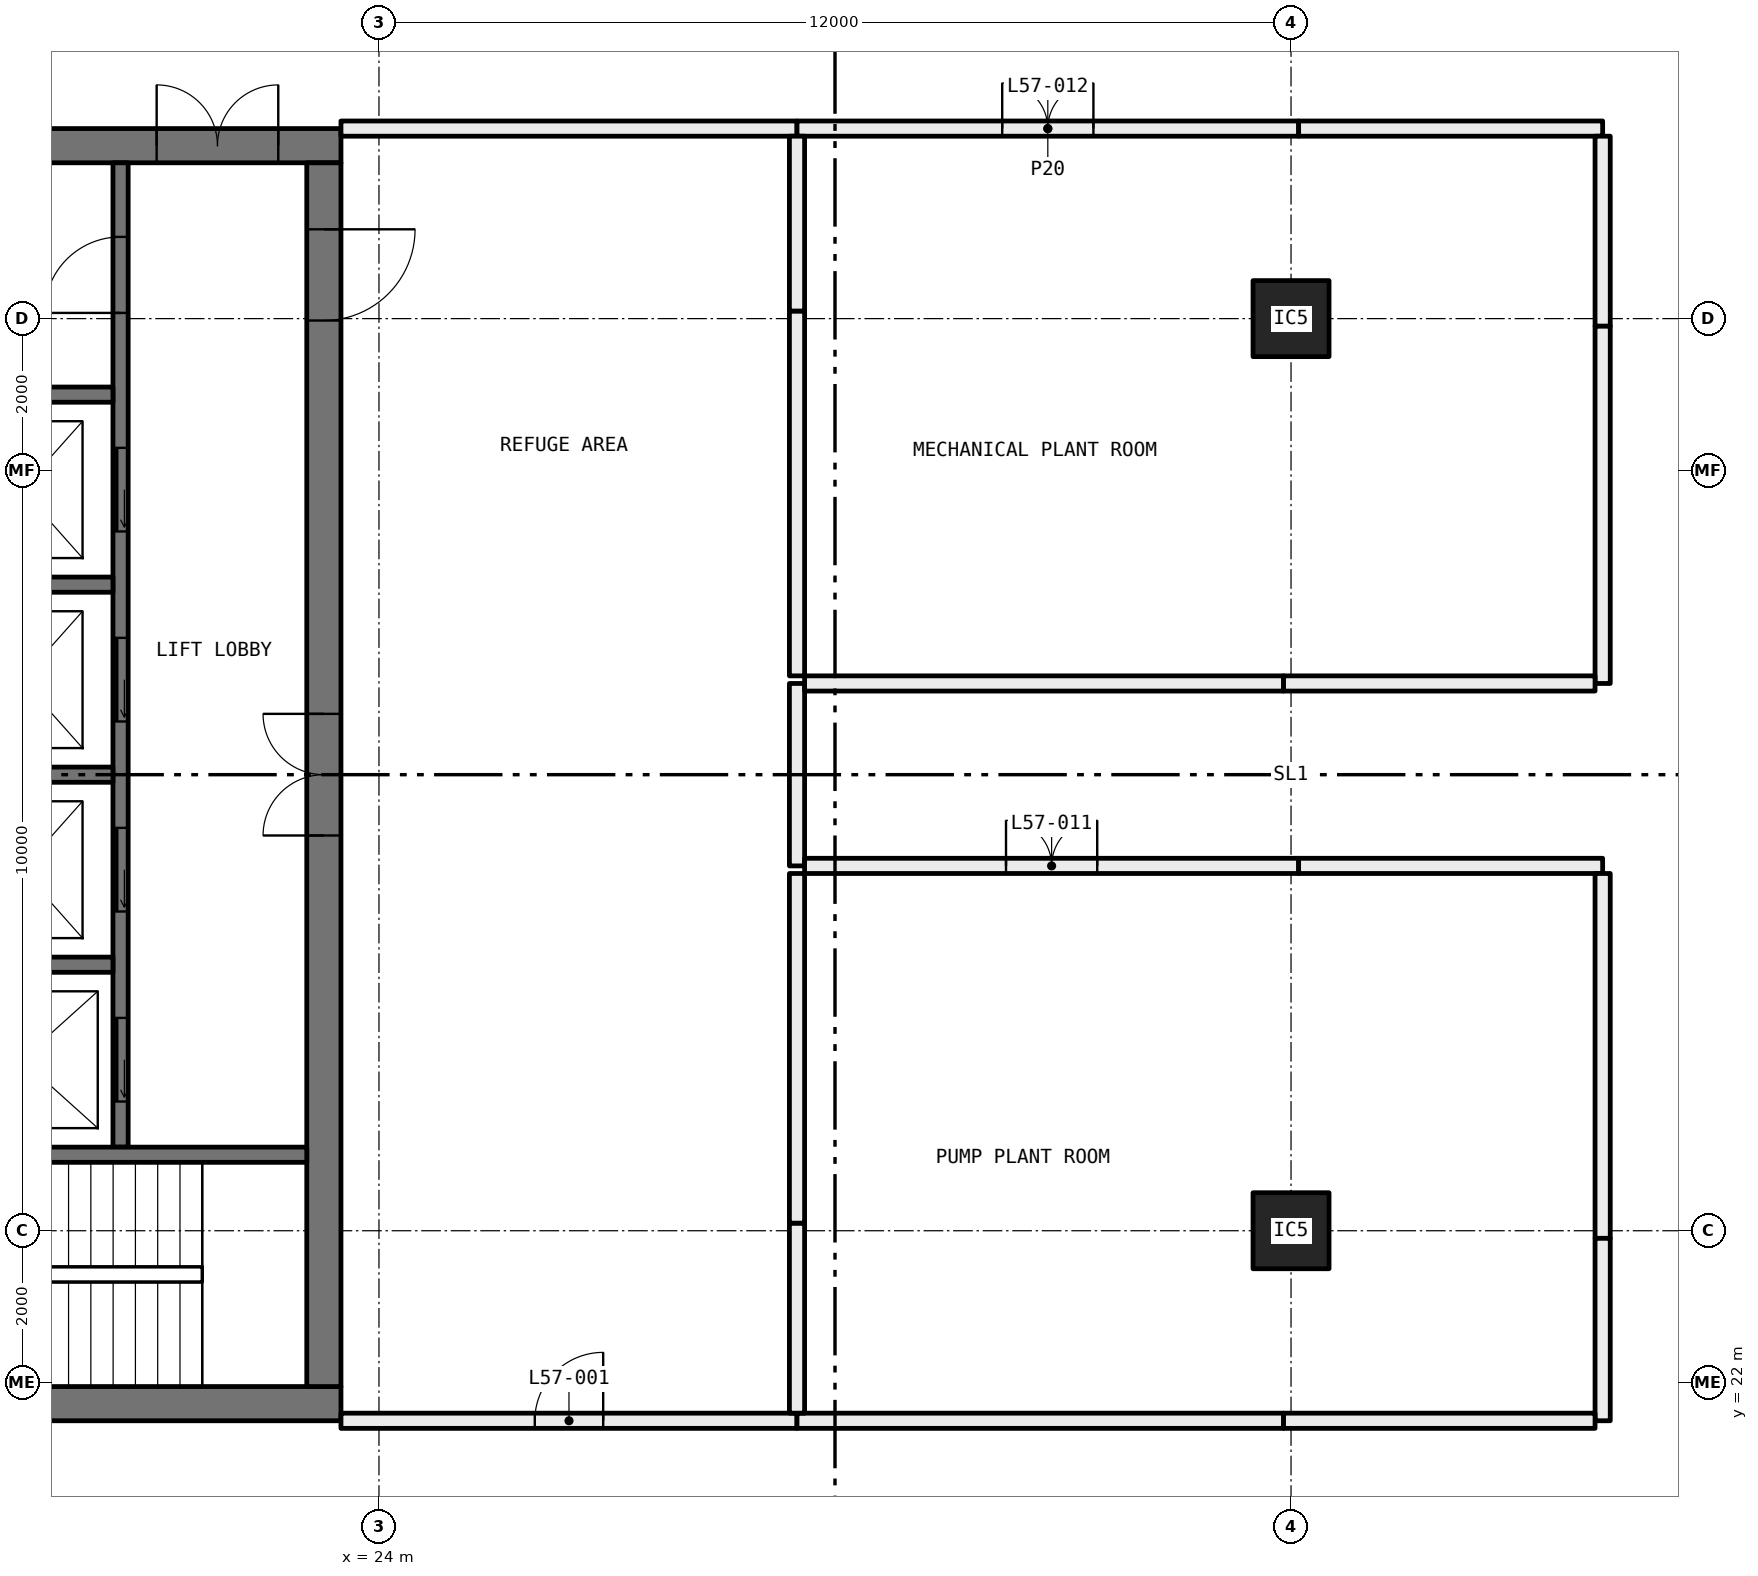
"""IFC4 building model, lengths in metres.
Left out: names, types, materials, properties, quantities, classifications, styles, units other than length and angle.
Written with IfcOpenShell. Run it as: python <this file> out.ifc"""

import sys

from ifc_helpers import new_model, si_unit, direction, frame, frame_2d, origin, origin_2d, place, context, subcontext, project, spatial, rectangle, hollow_rectangle, extrude, element, fill, save


model = new_model("IFC4")
c1 = context("Model", 3, precision=1e-05, world=origin(), true_north=direction((0.0, 1.0)))
c2 = subcontext(c1, "Body", "Model", "MODEL_VIEW")
j1 = project(units=[si_unit("LENGTHUNIT", "METRE"), si_unit("PLANEANGLEUNIT", "RADIAN")], contexts=[c1])
p1 = place(None, origin())
s1 = spatial("IfcSite", under=j1, at=p1, CompositionType="ELEMENT")
p2 = place(p1, origin())
s2 = spatial("IfcBuilding", under=s1, at=p2, CompositionType="ELEMENT")
p3 = place(p2, frame((0.0, 0.0, 213.45)))
s3 = spatial("IfcBuildingStorey", under=s2, at=p3, CompositionType="ELEMENT", Elevation=213.45)
for number, where, z_axis, x_axis in (
    (1, (36.0, 24.0, 0.0), (0.0, 0.0, 1.0), (1.0, 0.0, 0.0)),
    (2, (36.0, 36.0, 0.0), (0.0, 0.0, 1.0), (1.0, 0.0, 0.0)),
):
    element("IfcColumn", number, at=place(p3, frame(where, z_axis=z_axis, x_axis=x_axis)), inside=s3, PredefinedType="COLUMN", context=c2, shape_type="SweptSolid", body=[
        extrude(hollow_rectangle(XDim=1.0, YDim=1.0, WallThickness=0.04, at=origin_2d()), origin(), (0.0, 0.0, 1.0), 4.1),
    ])
p4 = place(p3, frame((29.5, 21.5, 0.0), z_axis=(0.0, 0.0, 1.0), x_axis=(-1.0, 0.0, 0.0)))
e3 = element("IfcWall", 3, at=p4, inside=s3, PredefinedType="PARTITIONING", context=c2, shape_type="SweptSolid", body=[
    extrude(rectangle(XDim=6.0, YDim=0.2, at=frame_2d((3.0, 0.0))), origin(), (0.0, 0.0, 1.0), 4.1),
])
p5 = place(p4, frame((2.55, 0.0, 0.0)))
e4 = element("IfcOpeningElement", 4, at=p5, cuts=e3, PredefinedType="OPENING", context=c2, shape_type="SweptSolid", body=[
    extrude(rectangle(XDim=0.9, YDim=2.1, at=frame_2d((0.45, 1.05))), frame((0.0, 0.11, 0.0), z_axis=(0.0, -1.0, 0.0), x_axis=(1.0, 0.0, 0.0)), (0.0, 0.0, 1.0), 0.22),
])
p6 = place(p3, frame((23.5, 38.5, 0.0), z_axis=(0.0, 0.0, 1.0), x_axis=(1.0, 0.0, 0.0)))
e5 = element("IfcWall", 5, at=p6, inside=s3, PredefinedType="PARTITIONING", context=c2, shape_type="SweptSolid", body=[
    extrude(rectangle(XDim=6.0, YDim=0.2, at=frame_2d((3.0, 0.0))), origin(), (0.0, 0.0, 1.0), 4.1),
])
p7 = place(p3, frame((29.5, 31.2, 0.0), z_axis=(0.0, 0.0, 1.0), x_axis=(0.0, -1.0, 0.0)))
e6 = element("IfcWall", 6, at=p7, inside=s3, PredefinedType="PARTITIONING", context=c2, shape_type="SweptSolid", body=[
    extrude(rectangle(XDim=2.4, YDim=0.2, at=frame_2d((1.2, 0.0))), origin(), (0.0, 0.0, 1.0), 3.6),
])
p8 = place(p3, frame((29.6, 28.8, 0.0), z_axis=(0.0, 0.0, 1.0), x_axis=(1.0, 0.0, 0.0)))
e7 = element("IfcWall", 7, at=p8, inside=s3, PredefinedType="PARTITIONING", context=c2, shape_type="SweptSolid", body=[
    extrude(rectangle(XDim=6.5, YDim=0.2, at=frame_2d((3.25, 0.0))), origin(), (0.0, 0.0, 1.0), 3.5),
])
p9 = place(p8, frame((2.65, 0.0, 0.0)))
e8 = element("IfcOpeningElement", 8, at=p9, cuts=e7, PredefinedType="OPENING", context=c2, shape_type="SweptSolid", body=[
    extrude(rectangle(XDim=1.2, YDim=2.1, at=frame_2d((0.6, 1.05))), frame((0.0, 0.11, 0.0), z_axis=(0.0, -1.0, 0.0), x_axis=(1.0, 0.0, 0.0)), (0.0, 0.0, 1.0), 0.22),
])
p10 = place(p3, frame((36.1, 28.8, 0.0), z_axis=(0.0, 0.0, 1.0), x_axis=(1.0, 0.0, 0.0)))
e9 = element("IfcWall", 9, at=p10, inside=s3, PredefinedType="PARTITIONING", context=c2, shape_type="SweptSolid", body=[
    extrude(rectangle(XDim=4.0, YDim=0.2, at=frame_2d((2.0, 0.0))), origin(), (0.0, 0.0, 1.0), 4.1),
])
p11 = place(p3, frame((40.1, 28.7, 0.0), z_axis=(0.0, 0.0, 1.0), x_axis=(0.0, -1.0, 0.0)))
e10 = element("IfcWall", 10, at=p11, inside=s3, PredefinedType="PARTITIONING", context=c2, shape_type="SweptSolid", body=[
    extrude(rectangle(XDim=4.8, YDim=0.2, at=frame_2d((2.4, 0.0))), origin(), (0.0, 0.0, 1.0), 3.5),
])
p12 = place(p3, frame((40.1, 23.9, 0.0), z_axis=(0.0, 0.0, 1.0), x_axis=(0.0, -1.0, 0.0)))
e11 = element("IfcWall", 11, at=p12, inside=s3, PredefinedType="PARTITIONING", context=c2, shape_type="SweptSolid", body=[
    extrude(rectangle(XDim=2.4, YDim=0.2, at=frame_2d((1.2, 0.0))), origin(), (0.0, 0.0, 1.0), 4.1),
])
p13 = place(p3, frame((40.0, 21.5, 0.0), z_axis=(0.0, 0.0, 1.0), x_axis=(-1.0, 0.0, 0.0)))
e12 = element("IfcWall", 12, at=p13, inside=s3, PredefinedType="PARTITIONING", context=c2, shape_type="SweptSolid", body=[
    extrude(rectangle(XDim=4.1, YDim=0.2, at=frame_2d((2.05, 0.0))), origin(), (0.0, 0.0, 1.0), 3.5),
])
p14 = place(p3, frame((35.9, 21.5, 0.0), z_axis=(0.0, 0.0, 1.0), x_axis=(-1.0, 0.0, 0.0)))
e13 = element("IfcWall", 13, at=p14, inside=s3, PredefinedType="PARTITIONING", context=c2, shape_type="SweptSolid", body=[
    extrude(rectangle(XDim=6.4, YDim=0.2, at=frame_2d((3.2, 0.0))), origin(), (0.0, 0.0, 1.0), 4.1),
])
p15 = place(p3, frame((29.5, 38.5, 0.0), z_axis=(0.0, 0.0, 1.0), x_axis=(1.0, 0.0, 0.0)))
e14 = element("IfcWall", 14, at=p15, inside=s3, PredefinedType="PARTITIONING", context=c2, shape_type="SweptSolid", body=[
    extrude(rectangle(XDim=6.6, YDim=0.2, at=frame_2d((3.3, 0.0))), origin(), (0.0, 0.0, 1.0), 3.5),
])
p16 = place(p15, frame((2.7, 0.0, 0.0)))
e15 = element("IfcOpeningElement", 15, at=p16, cuts=e14, PredefinedType="OPENING", context=c2, shape_type="SweptSolid", body=[
    extrude(rectangle(XDim=1.2, YDim=2.1, at=frame_2d((0.6, 1.05))), frame((0.0, 0.11, 0.0), z_axis=(0.0, -1.0, 0.0), x_axis=(1.0, 0.0, 0.0)), (0.0, 0.0, 1.0), 0.22),
])
p17 = place(p3, frame((36.1, 38.5, 0.0), z_axis=(0.0, 0.0, 1.0), x_axis=(1.0, 0.0, 0.0)))
e16 = element("IfcWall", 16, at=p17, inside=s3, PredefinedType="PARTITIONING", context=c2, shape_type="SweptSolid", body=[
    extrude(rectangle(XDim=4.0, YDim=0.2, at=frame_2d((2.0, 0.0))), origin(), (0.0, 0.0, 1.0), 4.1),
])
p18 = place(p3, frame((40.1, 38.4, 0.0), z_axis=(0.0, 0.0, 1.0), x_axis=(0.0, -1.0, 0.0)))
e17 = element("IfcWall", 17, at=p18, inside=s3, PredefinedType="PARTITIONING", context=c2, shape_type="SweptSolid", body=[
    extrude(rectangle(XDim=2.5, YDim=0.2, at=frame_2d((1.25, 0.0))), origin(), (0.0, 0.0, 1.0), 3.5),
])
p19 = place(p3, frame((40.1, 35.9, 0.0), z_axis=(0.0, 0.0, 1.0), x_axis=(0.0, -1.0, 0.0)))
e18 = element("IfcWall", 18, at=p19, inside=s3, PredefinedType="PARTITIONING", context=c2, shape_type="SweptSolid", body=[
    extrude(rectangle(XDim=4.7, YDim=0.2, at=frame_2d((2.35, 0.0))), origin(), (0.0, 0.0, 1.0), 4.1),
])
p20 = place(p3, frame((40.0, 31.2, 0.0), z_axis=(0.0, 0.0, 1.0), x_axis=(-1.0, 0.0, 0.0)))
e19 = element("IfcWall", 19, at=p20, inside=s3, PredefinedType="PARTITIONING", context=c2, shape_type="SweptSolid", body=[
    extrude(rectangle(XDim=4.1, YDim=0.2, at=frame_2d((2.05, 0.0))), origin(), (0.0, 0.0, 1.0), 3.5),
])
p21 = place(p3, frame((35.9, 31.2, 0.0), z_axis=(0.0, 0.0, 1.0), x_axis=(-1.0, 0.0, 0.0)))
e20 = element("IfcWall", 20, at=p21, inside=s3, PredefinedType="PARTITIONING", context=c2, shape_type="SweptSolid", body=[
    extrude(rectangle(XDim=6.3, YDim=0.2, at=frame_2d((3.15, 0.0))), origin(), (0.0, 0.0, 1.0), 4.1),
])
p22 = place(p3, frame((29.5, 21.6, 0.0), z_axis=(0.0, 0.0, 1.0), x_axis=(0.0, 1.0, 0.0)))
e21 = element("IfcWall", 21, at=p22, inside=s3, PredefinedType="PARTITIONING", context=c2, shape_type="SweptSolid", body=[
    extrude(rectangle(XDim=2.5, YDim=0.2, at=frame_2d((1.25, 0.0))), origin(), (0.0, 0.0, 1.0), 3.5),
])
p23 = place(p3, frame((29.5, 24.1, 0.0), z_axis=(0.0, 0.0, 1.0), x_axis=(0.0, 1.0, 0.0)))
e22 = element("IfcWall", 22, at=p23, inside=s3, PredefinedType="PARTITIONING", context=c2, shape_type="SweptSolid", body=[
    extrude(rectangle(XDim=4.6, YDim=0.2, at=frame_2d((2.3, 0.0))), origin(), (0.0, 0.0, 1.0), 3.6),
])
p24 = place(p3, frame((29.5, 31.3, 0.0), z_axis=(0.0, 0.0, 1.0), x_axis=(0.0, 1.0, 0.0)))
e23 = element("IfcWall", 23, at=p24, inside=s3, PredefinedType="PARTITIONING", context=c2, shape_type="SweptSolid", body=[
    extrude(rectangle(XDim=4.8, YDim=0.2, at=frame_2d((2.4, 0.0))), origin(), (0.0, 0.0, 1.0), 3.5),
])
p25 = place(p3, frame((29.5, 36.1, 0.0), z_axis=(0.0, 0.0, 1.0), x_axis=(0.0, 1.0, 0.0)))
e24 = element("IfcWall", 24, at=p25, inside=s3, PredefinedType="PARTITIONING", context=c2, shape_type="SweptSolid", body=[
    extrude(rectangle(XDim=2.3, YDim=0.2, at=frame_2d((1.15, 0.0))), origin(), (0.0, 0.0, 1.0), 4.1),
])
p26 = place(p3, frame((12.5, 21.725, 0.0), z_axis=(0.0, 0.0, 1.0), x_axis=(1.0, 0.0, 0.0)))
e25 = element("IfcWall", 25, at=p26, inside=s3, PredefinedType="SHEAR", context=c2, shape_type="SweptSolid", body=[
    extrude(rectangle(XDim=11.0, YDim=0.45, at=frame_2d((5.5, 0.0))), origin(), (0.0, 0.0, 1.0), 4.1),
])
p27 = place(p26, frame((1.125, 0.0, 0.0)))
e26 = element("IfcOpeningElement", 26, at=p27, cuts=e25, PredefinedType="OPENING", context=c2, shape_type="SweptSolid", body=[
    extrude(rectangle(XDim=1.0, YDim=2.1, at=frame_2d((0.5, 1.05))), frame((0.0, 0.235, 0.0), z_axis=(0.0, -1.0, 0.0), x_axis=(1.0, 0.0, 0.0)), (0.0, 0.0, 1.0), 0.47),
])
p28 = place(p3, frame((12.5, 38.275, 0.0), z_axis=(0.0, 0.0, 1.0), x_axis=(1.0, 0.0, 0.0)))
e27 = element("IfcWall", 27, at=p28, inside=s3, PredefinedType="SHEAR", context=c2, shape_type="SweptSolid", body=[
    extrude(rectangle(XDim=11.0, YDim=0.45, at=frame_2d((5.5, 0.0))), origin(), (0.0, 0.0, 1.0), 4.1),
])
p29 = place(p28, frame((8.575, 0.0, 0.0)))
e28 = element("IfcOpeningElement", 28, at=p29, cuts=e27, PredefinedType="OPENING", context=c2, shape_type="SweptSolid", body=[
    extrude(rectangle(XDim=1.6, YDim=2.1, at=frame_2d((0.8, 1.05))), frame((0.0, 0.235, 0.0), z_axis=(0.0, -1.0, 0.0), x_axis=(1.0, 0.0, 0.0)), (0.0, 0.0, 1.0), 0.47),
])
p30 = place(p3, frame((23.275, 21.95, 0.0), z_axis=(0.0, 0.0, 1.0), x_axis=(0.0, 1.0, 0.0)))
e29 = element("IfcWall", 29, at=p30, inside=s3, PredefinedType="SHEAR", context=c2, shape_type="SweptSolid", body=[
    extrude(rectangle(XDim=16.1, YDim=0.45, at=frame_2d((8.05, 0.0))), origin(), (0.0, 0.0, 1.0), 4.1),
])
p31 = place(p30, frame((7.25, 0.0, 0.0)))
e30 = element("IfcOpeningElement", 30, at=p31, cuts=e29, PredefinedType="OPENING", context=c2, shape_type="SweptSolid", body=[
    extrude(rectangle(XDim=1.6, YDim=2.1, at=frame_2d((0.8, 1.05))), frame((0.0, 0.235, 0.0), z_axis=(0.0, -1.0, 0.0), x_axis=(1.0, 0.0, 0.0)), (0.0, 0.0, 1.0), 0.47),
])
p32 = place(p30, frame((14.025, 0.0, 0.0)))
e31 = element("IfcOpeningElement", 31, at=p32, cuts=e29, PredefinedType="OPENING", context=c2, shape_type="SweptSolid", body=[
    extrude(rectangle(XDim=1.2, YDim=2.1, at=frame_2d((0.6, 1.05))), frame((0.0, 0.235, 0.0), z_axis=(0.0, -1.0, 0.0), x_axis=(1.0, 0.0, 0.0)), (0.0, 0.0, 1.0), 0.47),
])
p33 = place(p3, frame((20.6, 25.1, 0.0), z_axis=(0.0, 0.0, 1.0), x_axis=(0.0, 1.0, 0.0)))
e32 = element("IfcWall", 32, at=p33, inside=s3, PredefinedType="SOLIDWALL", context=c2, shape_type="SweptSolid", body=[
    extrude(rectangle(XDim=12.95, YDim=0.2, at=frame_2d((6.475, 0.0))), origin(), (0.0, 0.0, 1.0), 4.1),
])
p34 = place(p33, frame((0.6, 0.0, 0.0)))
e33 = element("IfcOpeningElement", 33, at=p34, cuts=e32, PredefinedType="OPENING", context=c2, shape_type="SweptSolid", body=[
    extrude(rectangle(XDim=1.1, YDim=2.1, at=frame_2d((0.55, 1.05))), frame((0.0, 0.11, 0.0), z_axis=(0.0, -1.0, 0.0), x_axis=(1.0, 0.0, 0.0)), (0.0, 0.0, 1.0), 0.22),
])
p35 = place(p33, frame((3.1, 0.0, 0.0)))
e34 = element("IfcOpeningElement", 34, at=p35, cuts=e32, PredefinedType="OPENING", context=c2, shape_type="SweptSolid", body=[
    extrude(rectangle(XDim=1.1, YDim=2.1, at=frame_2d((0.55, 1.05))), frame((0.0, 0.11, 0.0), z_axis=(0.0, -1.0, 0.0), x_axis=(1.0, 0.0, 0.0)), (0.0, 0.0, 1.0), 0.22),
])
p36 = place(p33, frame((5.6, 0.0, 0.0)))
e35 = element("IfcOpeningElement", 35, at=p36, cuts=e32, PredefinedType="OPENING", context=c2, shape_type="SweptSolid", body=[
    extrude(rectangle(XDim=1.1, YDim=2.1, at=frame_2d((0.55, 1.05))), frame((0.0, 0.11, 0.0), z_axis=(0.0, -1.0, 0.0), x_axis=(1.0, 0.0, 0.0)), (0.0, 0.0, 1.0), 0.22),
])
p37 = place(p33, frame((8.1, 0.0, 0.0)))
e36 = element("IfcOpeningElement", 36, at=p37, cuts=e32, PredefinedType="OPENING", context=c2, shape_type="SweptSolid", body=[
    extrude(rectangle(XDim=1.1, YDim=2.1, at=frame_2d((0.55, 1.05))), frame((0.0, 0.11, 0.0), z_axis=(0.0, -1.0, 0.0), x_axis=(1.0, 0.0, 0.0)), (0.0, 0.0, 1.0), 0.22),
])
p38 = place(p33, frame((10.975, 0.0, 0.0)))
e37 = element("IfcOpeningElement", 37, at=p38, cuts=e32, PredefinedType="OPENING", context=c2, shape_type="SweptSolid", body=[
    extrude(rectangle(XDim=1.0, YDim=2.1, at=frame_2d((0.5, 1.05))), frame((0.0, 0.11, 0.0), z_axis=(0.0, -1.0, 0.0), x_axis=(1.0, 0.0, 0.0)), (0.0, 0.0, 1.0), 0.22),
])
for number, where, z_axis, x_axis in (
    (38, (15.5, 25.0, 0.0), (0.0, 0.0, 1.0), (1.0, 0.0, 0.0)),
    (39, (12.95, 35.0, 0.0), (0.0, 0.0, 1.0), (1.0, 0.0, 0.0)),
):
    element("IfcWall", number, at=place(p3, frame(where, z_axis=z_axis, x_axis=x_axis)), inside=s3, PredefinedType="SOLIDWALL", context=c2, shape_type="SweptSolid", body=[
        extrude(rectangle(XDim=7.55, YDim=0.2, at=frame_2d((3.775, 0.0))), origin(), (0.0, 0.0, 1.0), 4.1),
    ])
for number, where, z_axis, x_axis in (
    (40, (18.1, 27.5, 0.0), (0.0, 0.0, 1.0), (1.0, 0.0, 0.0)),
    (41, (18.1, 30.0, 0.0), (0.0, 0.0, 1.0), (1.0, 0.0, 0.0)),
    (42, (18.1, 32.5, 0.0), (0.0, 0.0, 1.0), (1.0, 0.0, 0.0)),
):
    element("IfcWall", number, at=place(p3, frame(where, z_axis=z_axis, x_axis=x_axis)), inside=s3, PredefinedType="SOLIDWALL", context=c2, shape_type="SweptSolid", body=[
        extrude(rectangle(XDim=2.4, YDim=0.2, at=frame_2d((1.2, 0.0))), origin(), (0.0, 0.0, 1.0), 4.1),
    ])
p39 = place(p5, frame((0.9, 0.0, 0.0), x_axis=(-1.0, 0.0, 0.0)))
e43 = element("IfcDoor", 43, at=p39, inside=s3, OperationType="SINGLE_SWING_LEFT", PredefinedType="DOOR", context=c2, shape_type="SweptSolid", body=[
    extrude(rectangle(XDim=0.9, YDim=2.1, at=frame_2d((0.45, 1.05))), frame((0.0, 0.025, 0.0), z_axis=(0.0, -1.0, 0.0), x_axis=(1.0, 0.0, 0.0)), (0.0, 0.0, 1.0), 0.05),
])
fill(e4, e43)
p40 = place(p9, origin())
e44 = element("IfcDoor", 44, at=p40, inside=s3, OperationType="DOUBLE_DOOR_SINGLE_SWING", PredefinedType="DOOR", context=c2, shape_type="SweptSolid", body=[
    extrude(rectangle(XDim=1.2, YDim=2.1, at=frame_2d((0.6, 1.05))), frame((0.0, 0.025, 0.0), z_axis=(0.0, -1.0, 0.0), x_axis=(1.0, 0.0, 0.0)), (0.0, 0.0, 1.0), 0.05),
])
fill(e8, e44)
p41 = place(p16, origin())
e45 = element("IfcDoor", 45, at=p41, inside=s3, OperationType="DOUBLE_DOOR_SINGLE_SWING", PredefinedType="DOOR", context=c2, shape_type="SweptSolid", body=[
    extrude(rectangle(XDim=1.2, YDim=2.1, at=frame_2d((0.6, 1.05))), frame((0.0, 0.025, 0.0), z_axis=(0.0, -1.0, 0.0), x_axis=(1.0, 0.0, 0.0)), (0.0, 0.0, 1.0), 0.05),
])
fill(e15, e45)
p42 = place(p34, origin())
e46 = element("IfcDoor", 46, at=p42, inside=s3, OperationType="SLIDING_TO_LEFT", PredefinedType="DOOR", context=c2, shape_type="SweptSolid", body=[
    extrude(rectangle(XDim=1.1, YDim=2.1, at=frame_2d((0.55, 1.05))), frame((0.0, 0.025, 0.0), z_axis=(0.0, -1.0, 0.0), x_axis=(1.0, 0.0, 0.0)), (0.0, 0.0, 1.0), 0.05),
])
fill(e33, e46)
p43 = place(p35, origin())
e47 = element("IfcDoor", 47, at=p43, inside=s3, OperationType="SLIDING_TO_LEFT", PredefinedType="DOOR", context=c2, shape_type="SweptSolid", body=[
    extrude(rectangle(XDim=1.1, YDim=2.1, at=frame_2d((0.55, 1.05))), frame((0.0, 0.025, 0.0), z_axis=(0.0, -1.0, 0.0), x_axis=(1.0, 0.0, 0.0)), (0.0, 0.0, 1.0), 0.05),
])
fill(e34, e47)
p44 = place(p36, origin())
e48 = element("IfcDoor", 48, at=p44, inside=s3, OperationType="SLIDING_TO_LEFT", PredefinedType="DOOR", context=c2, shape_type="SweptSolid", body=[
    extrude(rectangle(XDim=1.1, YDim=2.1, at=frame_2d((0.55, 1.05))), frame((0.0, 0.025, 0.0), z_axis=(0.0, -1.0, 0.0), x_axis=(1.0, 0.0, 0.0)), (0.0, 0.0, 1.0), 0.05),
])
fill(e35, e48)
p45 = place(p37, origin())
e49 = element("IfcDoor", 49, at=p45, inside=s3, OperationType="SLIDING_TO_LEFT", PredefinedType="DOOR", context=c2, shape_type="SweptSolid", body=[
    extrude(rectangle(XDim=1.1, YDim=2.1, at=frame_2d((0.55, 1.05))), frame((0.0, 0.025, 0.0), z_axis=(0.0, -1.0, 0.0), x_axis=(1.0, 0.0, 0.0)), (0.0, 0.0, 1.0), 0.05),
])
fill(e36, e49)
p46 = place(p38, origin())
e50 = element("IfcDoor", 50, at=p46, inside=s3, OperationType="SINGLE_SWING_RIGHT", PredefinedType="DOOR", context=c2, shape_type="SweptSolid", body=[
    extrude(rectangle(XDim=1.0, YDim=2.1, at=frame_2d((0.5, 1.05))), frame((0.0, 0.025, 0.0), z_axis=(0.0, -1.0, 0.0), x_axis=(1.0, 0.0, 0.0)), (0.0, 0.0, 1.0), 0.05),
])
fill(e37, e50)
p47 = place(p29, origin())
e51 = element("IfcDoor", 51, at=p47, inside=s3, OperationType="DOUBLE_DOOR_SINGLE_SWING", PredefinedType="DOOR", context=c2, shape_type="SweptSolid", body=[
    extrude(rectangle(XDim=1.6, YDim=2.1, at=frame_2d((0.8, 1.05))), frame((0.0, 0.025, 0.0), z_axis=(0.0, -1.0, 0.0), x_axis=(1.0, 0.0, 0.0)), (0.0, 0.0, 1.0), 0.05),
])
fill(e28, e51)
p48 = place(p31, origin())
e52 = element("IfcDoor", 52, at=p48, inside=s3, OperationType="DOUBLE_DOOR_SINGLE_SWING", PredefinedType="DOOR", context=c2, shape_type="SweptSolid", body=[
    extrude(rectangle(XDim=1.6, YDim=2.1, at=frame_2d((0.8, 1.05))), frame((0.0, 0.025, 0.0), z_axis=(0.0, -1.0, 0.0), x_axis=(1.0, 0.0, 0.0)), (0.0, 0.0, 1.0), 0.05),
])
fill(e30, e52)
p49 = place(p32, frame((1.2, 0.0, 0.0), x_axis=(-1.0, 0.0, 0.0)))
e53 = element("IfcDoor", 53, at=p49, inside=s3, OperationType="SINGLE_SWING_RIGHT", PredefinedType="DOOR", context=c2, shape_type="SweptSolid", body=[
    extrude(rectangle(XDim=1.2, YDim=2.1, at=frame_2d((0.6, 1.05))), frame((0.0, 0.025, 0.0), z_axis=(0.0, -1.0, 0.0), x_axis=(1.0, 0.0, 0.0)), (0.0, 0.0, 1.0), 0.05),
])
fill(e31, e53)
save(model, sys.argv[1])
